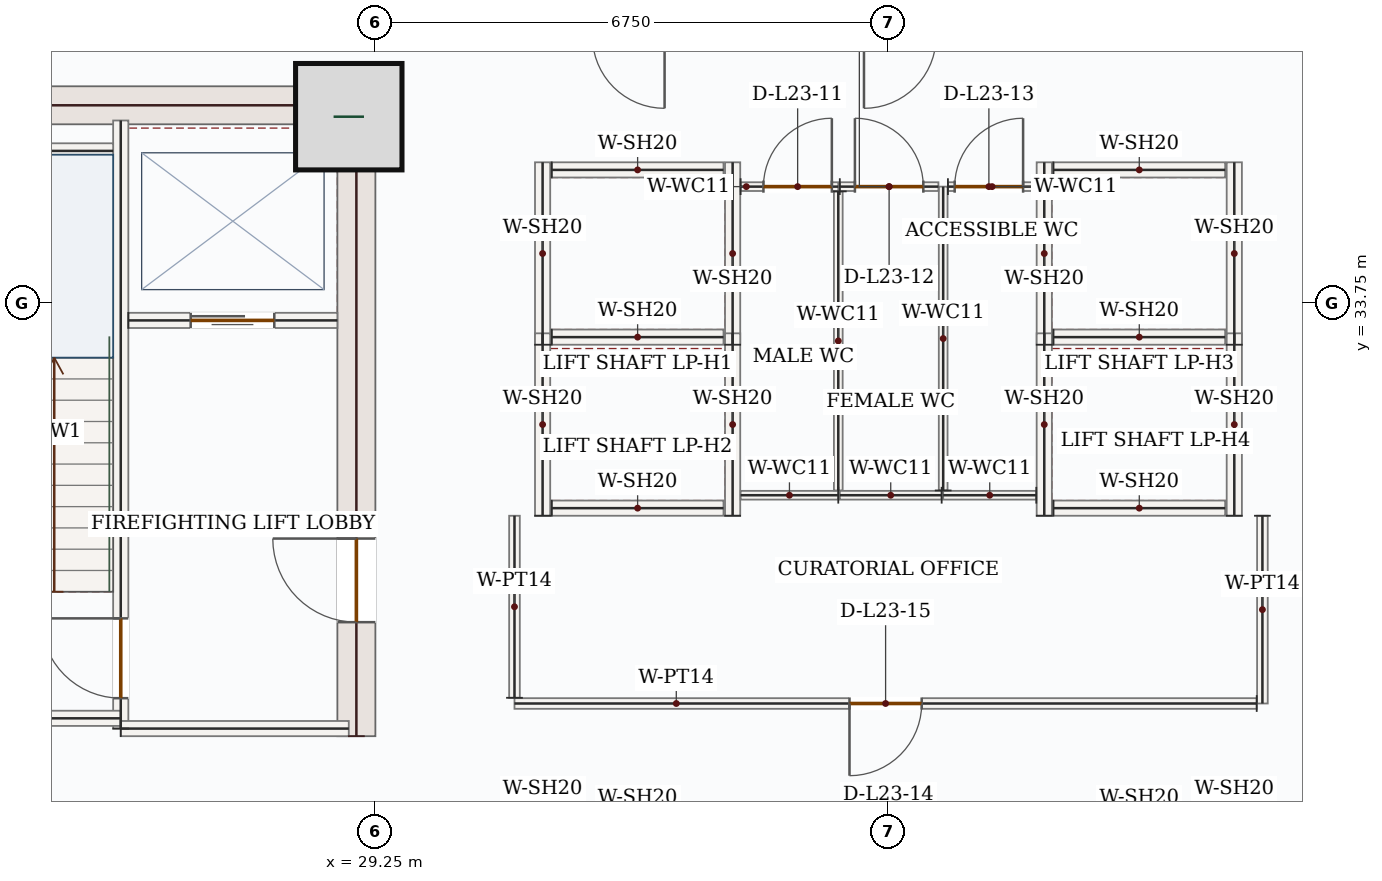
"""IFC4 building model, lengths in metres.
Left out: names, types, materials, properties, quantities, classifications, styles, units other than length and angle.
Written with IfcOpenShell. Run it as: python <this file> out.ifc"""

import sys

from ifc_helpers import new_model, si_unit, direction, frame, frame_2d, origin, origin_2d, place, context, subcontext, project, spatial, rectangle, extrude, source, transform, mapped, element, fill, save


model = new_model("IFC4")
c1 = context("Model", 3, precision=1e-05, world=origin(), true_north=direction((0.0, 1.0)))
c2 = subcontext(c1, "Body", "Model", "MODEL_VIEW")
j1 = project(units=[si_unit("LENGTHUNIT", "METRE"), si_unit("PLANEANGLEUNIT", "RADIAN")], contexts=[c1])
p1 = place(None, origin())
s1 = spatial("IfcSite", under=j1, at=p1, CompositionType="ELEMENT")
p2 = place(p1, origin())
s2 = spatial("IfcBuilding", under=s1, at=p2, CompositionType="ELEMENT")
p3 = place(p2, frame((0.0, 0.0, 104.7)))
s3 = spatial("IfcBuildingStorey", under=s2, at=p3, CompositionType="ELEMENT", Elevation=104.7)
p4 = place(p3, frame((29.0, 28.05, 0.0), z_axis=(0.0, 0.0, 1.0), x_axis=(0.0, 1.0, 0.0)))
e1 = element("IfcWall", 1, at=p4, inside=s3, PredefinedType="SHEAR", context=c2, shape_type="SweptSolid", body=[
    extrude(rectangle(XDim=8.55, YDim=0.5, at=frame_2d((4.275, 0.0))), origin(), (0.0, 0.0, 1.0), 3.95),
])
p5 = place(p4, frame((1.5, 0.0, 0.0)))
e2 = element("IfcOpeningElement", 2, at=p5, cuts=e1, PredefinedType="OPENING", context=c2, shape_type="SweptSolid", body=[
    extrude(rectangle(XDim=1.1, YDim=2.2, at=frame_2d((0.55, 1.1))), frame((0.0, 0.26, 0.0), z_axis=(0.0, -1.0, 0.0), x_axis=(1.0, 0.0, 0.0)), (0.0, 0.0, 1.0), 0.52),
])
m1 = source(origin(), c2, "Body", "SweptSolid", [
    extrude(rectangle(XDim=7.0, YDim=0.5, at=frame_2d((3.5, 0.0))), origin(), (0.0, 0.0, 1.0), 3.95),
])
p6 = place(p3, frame((21.75, 36.35, 0.0), z_axis=(0.0, 0.0, 1.0), x_axis=(1.0, 0.0, 0.0)))
e3 = element("IfcWall", 3, at=p6, inside=s3, PredefinedType="SHEAR", context=c2, shape_type="MappedRepresentation", body=[
    mapped(m1, transform((0.0, 0.0, 0.0), x_axis=(1.0, 0.0, 0.0), y_axis=(0.0, 1.0, 0.0), z_axis=(0.0, 0.0, 1.0), scale=1.0)),
])
m2 = source(origin(), c2, "Body", "SweptSolid", [
    extrude(rectangle(XDim=1.4, YDim=1.4, at=origin_2d()), origin(), (0.0, 0.0, 1.0), 4.2),
])
p7 = place(p3, frame((28.9, 36.2, 0.0), z_axis=(0.0, 0.0, 1.0), x_axis=(1.0, 0.0, 0.0)))
e4 = element("IfcColumn", 4, at=p7, inside=s3, PredefinedType="COLUMN", context=c2, shape_type="MappedRepresentation", body=[
    mapped(m2, transform((0.0, 0.0, 0.0), x_axis=(1.0, 0.0, 0.0), y_axis=(0.0, 1.0, 0.0), z_axis=(0.0, 0.0, 1.0), scale=1.0)),
])
p8 = place(p3, frame((25.9, 28.15, 0.0), z_axis=(0.0, 0.0, 1.0), x_axis=(0.0, 1.0, 0.0)))
e5 = element("IfcWall", 5, at=p8, inside=s3, PredefinedType="SOLIDWALL", context=c2, shape_type="SweptSolid", body=[
    extrude(rectangle(XDim=8.0, YDim=0.2, at=frame_2d((4.0, 0.0))), origin(), (0.0, 0.0, 1.0), 3.95),
])
p9 = place(p8, frame((0.4, 0.0, 0.0)))
e6 = element("IfcOpeningElement", 6, at=p9, cuts=e5, PredefinedType="OPENING", context=c2, shape_type="SweptSolid", body=[
    extrude(rectangle(XDim=1.05, YDim=2.15, at=frame_2d((0.525, 1.075))), frame((0.0, 0.11, 0.0), z_axis=(0.0, -1.0, 0.0), x_axis=(1.0, 0.0, 0.0)), (0.0, 0.0, 1.0), 0.22),
])
m3 = source(origin(), c2, "Body", "SweptSolid", [
    extrude(rectangle(XDim=4.25, YDim=0.2, at=frame_2d((2.125, 0.0))), origin(), (0.0, 0.0, 1.0), 3.95),
])
p10 = place(p3, frame((21.65, 28.285, 0.0), z_axis=(0.0, 0.0, 1.0), x_axis=(1.0, 0.0, 0.0)))
e7 = element("IfcWall", 7, at=p10, inside=s3, PredefinedType="SOLIDWALL", context=c2, shape_type="MappedRepresentation", body=[
    mapped(m3, transform((0.0, 0.0, 0.0), x_axis=(1.0, 0.0, 0.0), y_axis=(0.0, 1.0, 0.0), z_axis=(0.0, 0.0, 1.0), scale=1.0)),
])
m4 = source(origin(), c2, "Body", "SweptSolid", [
    extrude(rectangle(XDim=3.0, YDim=0.2, at=frame_2d((1.5, 0.0))), origin(), (0.0, 0.0, 1.0), 3.95),
])
p11 = place(p3, frame((25.9, 28.15, 0.0), z_axis=(0.0, 0.0, 1.0), x_axis=(1.0, 0.0, 0.0)))
e8 = element("IfcWall", 8, at=p11, inside=s3, PredefinedType="SOLIDWALL", context=c2, shape_type="MappedRepresentation", body=[
    mapped(m4, transform((0.0, 0.0, 0.0), x_axis=(1.0, 0.0, 0.0), y_axis=(0.0, 1.0, 0.0), z_axis=(0.0, 0.0, 1.0), scale=1.0)),
])
m5 = source(origin(), c2, "Body", "SweptSolid", [
    extrude(rectangle(XDim=3.25, YDim=0.2, at=frame_2d((1.625, 0.0))), origin(), (0.0, 0.0, 1.0), 3.95),
])
p12 = place(p3, frame((22.55, 35.75, 0.0), z_axis=(0.0, 0.0, 1.0), x_axis=(1.0, 0.0, 0.0)))
e9 = element("IfcWall", 9, at=p12, inside=s3, PredefinedType="SOLIDWALL", context=c2, shape_type="MappedRepresentation", body=[
    mapped(m5, transform((0.0, 0.0, 0.0), x_axis=(1.0, 0.0, 0.0), y_axis=(0.0, 1.0, 0.0), z_axis=(0.0, 0.0, 1.0), scale=1.0)),
])
p13 = place(p3, frame((26.0, 33.52, 0.0), z_axis=(0.0, 0.0, 1.0), x_axis=(1.0, 0.0, 0.0)))
e10 = element("IfcWall", 10, at=p13, inside=s3, PredefinedType="SOLIDWALL", context=c2, shape_type="SweptSolid", body=[
    extrude(rectangle(XDim=2.75, YDim=0.2, at=frame_2d((1.375, 0.0))), origin(), (0.0, 0.0, 1.0), 3.95),
])
p14 = place(p13, frame((0.82, 0.0, 0.0)))
e11 = element("IfcOpeningElement", 11, at=p14, cuts=e10, PredefinedType="OPENING", context=c2, shape_type="SweptSolid", body=[
    extrude(rectangle(XDim=1.1, YDim=2.15, at=frame_2d((0.55, 1.075))), frame((0.0, 0.11, 0.0), z_axis=(0.0, -1.0, 0.0), x_axis=(1.0, 0.0, 0.0)), (0.0, 0.0, 1.0), 0.22),
])
m6 = source(origin(), c2, "Body", "SweptSolid", [
    extrude(rectangle(XDim=2.4, YDim=0.2, at=frame_2d((1.2, 0.0))), origin(), (0.0, 0.0, 1.0), 3.95),
])
for number, where, z_axis, x_axis in (
    (12, (31.45, 33.2, 0.0), (0.0, 0.0, 1.0), (0.0, 1.0, 0.0)),
    (13, (33.95, 33.2, 0.0), (0.0, 0.0, 1.0), (0.0, 1.0, 0.0)),
):
    element("IfcWall", number, at=place(p3, frame(where, z_axis=z_axis, x_axis=x_axis)), inside=s3, PredefinedType="SOLIDWALL", context=c2, shape_type="MappedRepresentation", body=[
        mapped(m6, transform((0.0, 0.0, 0.0), x_axis=(1.0, 0.0, 0.0), y_axis=(0.0, 1.0, 0.0), z_axis=(0.0, 0.0, 1.0), scale=1.0)),
    ])
m7 = source(origin(), c2, "Body", "SweptSolid", [
    extrude(rectangle(XDim=2.26, YDim=0.2, at=frame_2d((1.13, 0.0))), origin(), (0.0, 0.0, 1.0), 3.95),
])
for number, where, z_axis, x_axis in (
    (14, (31.57, 33.3, 0.0), (0.0, 0.0, 1.0), (1.0, 0.0, 0.0)),
    (15, (31.57, 35.5, 0.0), (0.0, 0.0, 1.0), (1.0, 0.0, 0.0)),
):
    element("IfcWall", number, at=place(p3, frame(where, z_axis=z_axis, x_axis=x_axis)), inside=s3, PredefinedType="SOLIDWALL", context=c2, shape_type="MappedRepresentation", body=[
        mapped(m7, transform((0.0, 0.0, 0.0), x_axis=(1.0, 0.0, 0.0), y_axis=(0.0, 1.0, 0.0), z_axis=(0.0, 0.0, 1.0), scale=1.0)),
    ])
for number, where, z_axis, x_axis in (
    (16, (31.45, 30.95, 0.0), (0.0, 0.0, 1.0), (0.0, 1.0, 0.0)),
    (17, (33.95, 30.95, 0.0), (0.0, 0.0, 1.0), (0.0, 1.0, 0.0)),
):
    element("IfcWall", number, at=place(p3, frame(where, z_axis=z_axis, x_axis=x_axis)), inside=s3, PredefinedType="SOLIDWALL", context=c2, shape_type="MappedRepresentation", body=[
        mapped(m6, transform((0.0, 0.0, 0.0), x_axis=(1.0, 0.0, 0.0), y_axis=(0.0, 1.0, 0.0), z_axis=(0.0, 0.0, 1.0), scale=1.0)),
    ])
p15 = place(p3, frame((31.57, 31.05, 0.0), z_axis=(0.0, 0.0, 1.0), x_axis=(1.0, 0.0, 0.0)))
e18 = element("IfcWall", 18, at=p15, inside=s3, PredefinedType="SOLIDWALL", context=c2, shape_type="MappedRepresentation", body=[
    mapped(m7, transform((0.0, 0.0, 0.0), x_axis=(1.0, 0.0, 0.0), y_axis=(0.0, 1.0, 0.0), z_axis=(0.0, 0.0, 1.0), scale=1.0)),
])
for number, where, z_axis, x_axis in (
    (19, (38.05, 33.2, 0.0), (0.0, 0.0, 1.0), (0.0, 1.0, 0.0)),
    (20, (40.55, 33.2, 0.0), (0.0, 0.0, 1.0), (0.0, 1.0, 0.0)),
):
    element("IfcWall", number, at=place(p3, frame(where, z_axis=z_axis, x_axis=x_axis)), inside=s3, PredefinedType="SOLIDWALL", context=c2, shape_type="MappedRepresentation", body=[
        mapped(m6, transform((0.0, 0.0, 0.0), x_axis=(1.0, 0.0, 0.0), y_axis=(0.0, 1.0, 0.0), z_axis=(0.0, 0.0, 1.0), scale=1.0)),
    ])
for number, where, z_axis, x_axis in (
    (21, (38.17, 33.3, 0.0), (0.0, 0.0, 1.0), (1.0, 0.0, 0.0)),
    (22, (38.17, 35.5, 0.0), (0.0, 0.0, 1.0), (1.0, 0.0, 0.0)),
):
    element("IfcWall", number, at=place(p3, frame(where, z_axis=z_axis, x_axis=x_axis)), inside=s3, PredefinedType="SOLIDWALL", context=c2, shape_type="MappedRepresentation", body=[
        mapped(m7, transform((0.0, 0.0, 0.0), x_axis=(1.0, 0.0, 0.0), y_axis=(0.0, 1.0, 0.0), z_axis=(0.0, 0.0, 1.0), scale=1.0)),
    ])
for number, where, z_axis, x_axis in (
    (23, (38.05, 30.95, 0.0), (0.0, 0.0, 1.0), (0.0, 1.0, 0.0)),
    (24, (40.55, 30.95, 0.0), (0.0, 0.0, 1.0), (0.0, 1.0, 0.0)),
):
    element("IfcWall", number, at=place(p3, frame(where, z_axis=z_axis, x_axis=x_axis)), inside=s3, PredefinedType="SOLIDWALL", context=c2, shape_type="MappedRepresentation", body=[
        mapped(m6, transform((0.0, 0.0, 0.0), x_axis=(1.0, 0.0, 0.0), y_axis=(0.0, 1.0, 0.0), z_axis=(0.0, 0.0, 1.0), scale=1.0)),
    ])
p16 = place(p3, frame((38.17, 31.05, 0.0), z_axis=(0.0, 0.0, 1.0), x_axis=(1.0, 0.0, 0.0)))
e25 = element("IfcWall", 25, at=p16, inside=s3, PredefinedType="SOLIDWALL", context=c2, shape_type="MappedRepresentation", body=[
    mapped(m7, transform((0.0, 0.0, 0.0), x_axis=(1.0, 0.0, 0.0), y_axis=(0.0, 1.0, 0.0), z_axis=(0.0, 0.0, 1.0), scale=1.0)),
])
m8 = source(origin(), c2, "Body", "SweptSolid", [
    extrude(rectangle(XDim=1.225, YDim=0.115, at=frame_2d((0.613, 0.0))), origin(), (0.0, 0.0, 1.0), 3.95),
])
p17 = place(p3, frame((37.945, 31.22, 0.0), z_axis=(0.0, 0.0, 1.0), x_axis=(-1.0, 0.0, 0.0)))
e26 = element("IfcWall", 26, at=p17, inside=s3, PredefinedType="PARTITIONING", context=c2, shape_type="MappedRepresentation", body=[
    mapped(m8, transform((0.0, 0.0, 0.0), x_axis=(1.0, 0.0, 0.0), y_axis=(0.0, 1.0, 0.0), z_axis=(0.0, 0.0, 1.0), scale=1.0)),
])
m9 = source(origin(), c2, "Body", "SweptSolid", [
    extrude(rectangle(XDim=3.998, YDim=0.115, at=frame_2d((1.999, 0.0))), origin(), (0.0, 0.0, 1.0), 3.95),
])
p18 = place(p3, frame((36.72, 31.282, 0.0), z_axis=(0.0, 0.0, 1.0), x_axis=(0.0, 1.0, 0.0)))
e27 = element("IfcWall", 27, at=p18, inside=s3, PredefinedType="PARTITIONING", context=c2, shape_type="MappedRepresentation", body=[
    mapped(m9, transform((0.0, 0.0, 0.0), x_axis=(1.0, 0.0, 0.0), y_axis=(0.0, 1.0, 0.0), z_axis=(0.0, 0.0, 1.0), scale=1.0)),
])
p19 = place(p3, frame((36.782, 35.28, 0.0), z_axis=(0.0, 0.0, 1.0), x_axis=(1.0, 0.0, 0.0)))
e28 = element("IfcWall", 28, at=p19, inside=s3, PredefinedType="PARTITIONING", context=c2, shape_type="SweptSolid", body=[
    extrude(rectangle(XDim=1.163, YDim=0.115, at=frame_2d((0.581, 0.0))), origin(), (0.0, 0.0, 1.0), 3.95),
])
p20 = place(p19, frame((0.089, 0.0, 0.0)))
e29 = element("IfcOpeningElement", 29, at=p20, cuts=e28, PredefinedType="OPENING", context=c2, shape_type="SweptSolid", body=[
    extrude(rectangle(XDim=0.9, YDim=2.1, at=frame_2d((0.45, 1.05))), frame((0.0, 0.067, 0.0), z_axis=(0.0, -1.0, 0.0), x_axis=(1.0, 0.0, 0.0)), (0.0, 0.0, 1.0), 0.135),
])
m10 = source(origin(), c2, "Body", "SweptSolid", [
    extrude(rectangle(XDim=1.285, YDim=0.115, at=frame_2d((0.643, 0.0))), origin(), (0.0, 0.0, 1.0), 3.95),
])
p21 = place(p3, frame((35.34, 31.22, 0.0), z_axis=(0.0, 0.0, 1.0), x_axis=(-1.0, 0.0, 0.0)))
e30 = element("IfcWall", 30, at=p21, inside=s3, PredefinedType="PARTITIONING", context=c2, shape_type="MappedRepresentation", body=[
    mapped(m10, transform((0.0, 0.0, 0.0), x_axis=(1.0, 0.0, 0.0), y_axis=(0.0, 1.0, 0.0), z_axis=(0.0, 0.0, 1.0), scale=1.0)),
])
p22 = place(p3, frame((34.055, 35.28, 0.0), z_axis=(0.0, 0.0, 1.0), x_axis=(1.0, 0.0, 0.0)))
e31 = element("IfcWall", 31, at=p22, inside=s3, PredefinedType="PARTITIONING", context=c2, shape_type="SweptSolid", body=[
    extrude(rectangle(XDim=1.285, YDim=0.115, at=frame_2d((0.643, 0.0))), origin(), (0.0, 0.0, 1.0), 3.95),
])
p23 = place(p22, frame((0.3, 0.0, 0.0)))
e32 = element("IfcOpeningElement", 32, at=p23, cuts=e31, PredefinedType="OPENING", context=c2, shape_type="SweptSolid", body=[
    extrude(rectangle(XDim=0.9, YDim=2.1, at=frame_2d((0.45, 1.05))), frame((0.0, 0.067, 0.0), z_axis=(0.0, -1.0, 0.0), x_axis=(1.0, 0.0, 0.0)), (0.0, 0.0, 1.0), 0.135),
])
m11 = source(origin(), c2, "Body", "SweptSolid", [
    extrude(rectangle(XDim=3.935, YDim=0.115, at=frame_2d((1.968, 0.0))), origin(), (0.0, 0.0, 1.0), 3.95),
])
p24 = place(p3, frame((35.34, 35.218, 0.0), z_axis=(0.0, 0.0, 1.0), x_axis=(0.0, -1.0, 0.0)))
e33 = element("IfcWall", 33, at=p24, inside=s3, PredefinedType="PARTITIONING", context=c2, shape_type="MappedRepresentation", body=[
    mapped(m11, transform((0.0, 0.0, 0.0), x_axis=(1.0, 0.0, 0.0), y_axis=(0.0, 1.0, 0.0), z_axis=(0.0, 0.0, 1.0), scale=1.0)),
])
m12 = source(origin(), c2, "Body", "SweptSolid", [
    extrude(rectangle(XDim=1.34, YDim=0.115, at=frame_2d((0.67, 0.0))), origin(), (0.0, 0.0, 1.0), 3.95),
])
p25 = place(p3, frame((36.7, 31.22, 0.0), z_axis=(0.0, 0.0, 1.0), x_axis=(-1.0, 0.0, 0.0)))
e34 = element("IfcWall", 34, at=p25, inside=s3, PredefinedType="PARTITIONING", context=c2, shape_type="MappedRepresentation", body=[
    mapped(m12, transform((0.0, 0.0, 0.0), x_axis=(1.0, 0.0, 0.0), y_axis=(0.0, 1.0, 0.0), z_axis=(0.0, 0.0, 1.0), scale=1.0)),
])
p26 = place(p3, frame((35.36, 35.28, 0.0), z_axis=(0.0, 0.0, 1.0), x_axis=(1.0, 0.0, 0.0)))
e35 = element("IfcWall", 35, at=p26, inside=s3, PredefinedType="PARTITIONING", context=c2, shape_type="SweptSolid", body=[
    extrude(rectangle(XDim=1.297, YDim=0.115, at=frame_2d((0.649, 0.0))), origin(), (0.0, 0.0, 1.0), 3.95),
])
p27 = place(p26, frame((0.199, 0.0, 0.0)))
e36 = element("IfcOpeningElement", 36, at=p27, cuts=e35, PredefinedType="OPENING", context=c2, shape_type="SweptSolid", body=[
    extrude(rectangle(XDim=0.9, YDim=2.1, at=frame_2d((0.45, 1.05))), frame((0.0, 0.067, 0.0), z_axis=(0.0, -1.0, 0.0), x_axis=(1.0, 0.0, 0.0)), (0.0, 0.0, 1.0), 0.135),
])
m13 = source(origin(), c2, "Body", "SweptSolid", [
    extrude(rectangle(XDim=2.47, YDim=0.14, at=frame_2d((1.235, 0.0))), origin(), (0.0, 0.0, 1.0), 3.95),
])
p28 = place(p3, frame((40.92, 30.95, 0.0), z_axis=(0.0, 0.0, 1.0), x_axis=(0.0, -1.0, 0.0)))
e37 = element("IfcWall", 37, at=p28, inside=s3, PredefinedType="PARTITIONING", context=c2, shape_type="MappedRepresentation", body=[
    mapped(m13, transform((0.0, 0.0, 0.0), x_axis=(1.0, 0.0, 0.0), y_axis=(0.0, 1.0, 0.0), z_axis=(0.0, 0.0, 1.0), scale=1.0)),
])
p29 = place(p3, frame((40.845, 28.48, 0.0), z_axis=(0.0, 0.0, 1.0), x_axis=(-1.0, 0.0, 0.0)))
e38 = element("IfcWall", 38, at=p29, inside=s3, PredefinedType="PARTITIONING", context=c2, shape_type="SweptSolid", body=[
    extrude(rectangle(XDim=9.765, YDim=0.14, at=frame_2d((4.882, 0.0))), origin(), (0.0, 0.0, 1.0), 3.95),
])
p30 = place(p29, frame((4.407, 0.0, 0.0)))
e39 = element("IfcOpeningElement", 39, at=p30, cuts=e38, PredefinedType="OPENING", context=c2, shape_type="SweptSolid", body=[
    extrude(rectangle(XDim=0.95, YDim=2.15, at=frame_2d((0.475, 1.075))), frame((0.0, 0.08, 0.0), z_axis=(0.0, -1.0, 0.0), x_axis=(1.0, 0.0, 0.0)), (0.0, 0.0, 1.0), 0.16),
])
m14 = source(origin(), c2, "Body", "SweptSolid", [
    extrude(rectangle(XDim=2.395, YDim=0.14, at=frame_2d((1.198, 0.0))), origin(), (0.0, 0.0, 1.0), 3.95),
])
p31 = place(p3, frame((31.08, 28.555, 0.0), z_axis=(0.0, 0.0, 1.0), x_axis=(0.0, 1.0, 0.0)))
e40 = element("IfcWall", 40, at=p31, inside=s3, PredefinedType="PARTITIONING", context=c2, shape_type="MappedRepresentation", body=[
    mapped(m14, transform((0.0, 0.0, 0.0), x_axis=(1.0, 0.0, 0.0), y_axis=(0.0, 1.0, 0.0), z_axis=(0.0, 0.0, 1.0), scale=1.0)),
])
m15 = source(origin(), c2, "Body", "SweptSolid", [
    extrude(rectangle(XDim=1.05, YDim=2.15, at=frame_2d((0.525, 1.075))), frame((0.0, 0.025, 0.0), z_axis=(0.0, -1.0, 0.0), x_axis=(1.0, 0.0, 0.0)), (0.0, 0.0, 1.0), 0.05),
])
p32 = place(p9, origin())
e41 = element("IfcDoor", 41, at=p32, inside=s3, OperationType="SINGLE_SWING_RIGHT", PredefinedType="DOOR", context=c2, shape_type="MappedRepresentation", body=[
    mapped(m15, transform((0.0, 0.0, 0.0), x_axis=(1.0, 0.0, 0.0), y_axis=(0.0, 1.0, 0.0), z_axis=(0.0, 0.0, 1.0), scale=1.0)),
])
fill(e6, e41)
m16 = source(origin(), c2, "Body", "SweptSolid", [
    extrude(rectangle(XDim=1.1, YDim=2.15, at=frame_2d((0.55, 1.075))), frame((0.0, 0.025, 0.0), z_axis=(0.0, -1.0, 0.0), x_axis=(1.0, 0.0, 0.0)), (0.0, 0.0, 1.0), 0.05),
])
p33 = place(p14, origin())
e42 = element("IfcDoor", 42, at=p33, inside=s3, OperationType="DOUBLE_DOOR_SLIDING", PredefinedType="DOOR", context=c2, shape_type="MappedRepresentation", body=[
    mapped(m16, transform((0.0, 0.0, 0.0), x_axis=(1.0, 0.0, 0.0), y_axis=(0.0, 1.0, 0.0), z_axis=(0.0, 0.0, 1.0), scale=1.0)),
])
fill(e11, e42)
m17 = source(origin(), c2, "Body", "SweptSolid", [
    extrude(rectangle(XDim=1.1, YDim=2.2, at=frame_2d((0.55, 1.1))), frame((0.0, 0.025, 0.0), z_axis=(0.0, -1.0, 0.0), x_axis=(1.0, 0.0, 0.0)), (0.0, 0.0, 1.0), 0.05),
])
p34 = place(p5, origin())
e43 = element("IfcDoor", 43, at=p34, inside=s3, OperationType="SINGLE_SWING_RIGHT", PredefinedType="DOOR", context=c2, shape_type="MappedRepresentation", body=[
    mapped(m17, transform((0.0, 0.0, 0.0), x_axis=(1.0, 0.0, 0.0), y_axis=(0.0, 1.0, 0.0), z_axis=(0.0, 0.0, 1.0), scale=1.0)),
])
fill(e2, e43)
m18 = source(origin(), c2, "Body", "SweptSolid", [
    extrude(rectangle(XDim=0.9, YDim=2.1, at=frame_2d((0.45, 1.05))), frame((0.0, 0.025, 0.0), z_axis=(0.0, -1.0, 0.0), x_axis=(1.0, 0.0, 0.0)), (0.0, 0.0, 1.0), 0.05),
])
p35 = place(p23, origin())
e44 = element("IfcDoor", 44, at=p35, inside=s3, OperationType="SINGLE_SWING_RIGHT", PredefinedType="DOOR", context=c2, shape_type="MappedRepresentation", body=[
    mapped(m18, transform((0.0, 0.0, 0.0), x_axis=(1.0, 0.0, 0.0), y_axis=(0.0, 1.0, 0.0), z_axis=(0.0, 0.0, 1.0), scale=1.0)),
])
fill(e32, e44)
p36 = place(p27, origin())
e45 = element("IfcDoor", 45, at=p36, inside=s3, OperationType="SINGLE_SWING_LEFT", PredefinedType="DOOR", context=c2, shape_type="MappedRepresentation", body=[
    mapped(m18, transform((0.0, 0.0, 0.0), x_axis=(1.0, 0.0, 0.0), y_axis=(0.0, 1.0, 0.0), z_axis=(0.0, 0.0, 1.0), scale=1.0)),
])
fill(e36, e45)
p37 = place(p20, origin())
e46 = element("IfcDoor", 46, at=p37, inside=s3, OperationType="SINGLE_SWING_RIGHT", PredefinedType="DOOR", context=c2, shape_type="MappedRepresentation", body=[
    mapped(m18, transform((0.0, 0.0, 0.0), x_axis=(1.0, 0.0, 0.0), y_axis=(0.0, 1.0, 0.0), z_axis=(0.0, 0.0, 1.0), scale=1.0)),
])
fill(e29, e46)
m19 = source(origin(), c2, "Body", "SweptSolid", [
    extrude(rectangle(XDim=0.95, YDim=2.15, at=frame_2d((0.475, 1.075))), frame((0.0, 0.025, 0.0), z_axis=(0.0, -1.0, 0.0), x_axis=(1.0, 0.0, 0.0)), (0.0, 0.0, 1.0), 0.05),
])
p38 = place(p30, origin())
e47 = element("IfcDoor", 47, at=p38, inside=s3, OperationType="SINGLE_SWING_RIGHT", PredefinedType="DOOR", context=c2, shape_type="MappedRepresentation", body=[
    mapped(m19, transform((0.0, 0.0, 0.0), x_axis=(1.0, 0.0, 0.0), y_axis=(0.0, 1.0, 0.0), z_axis=(0.0, 0.0, 1.0), scale=1.0)),
])
fill(e39, e47)
save(model, sys.argv[1])
